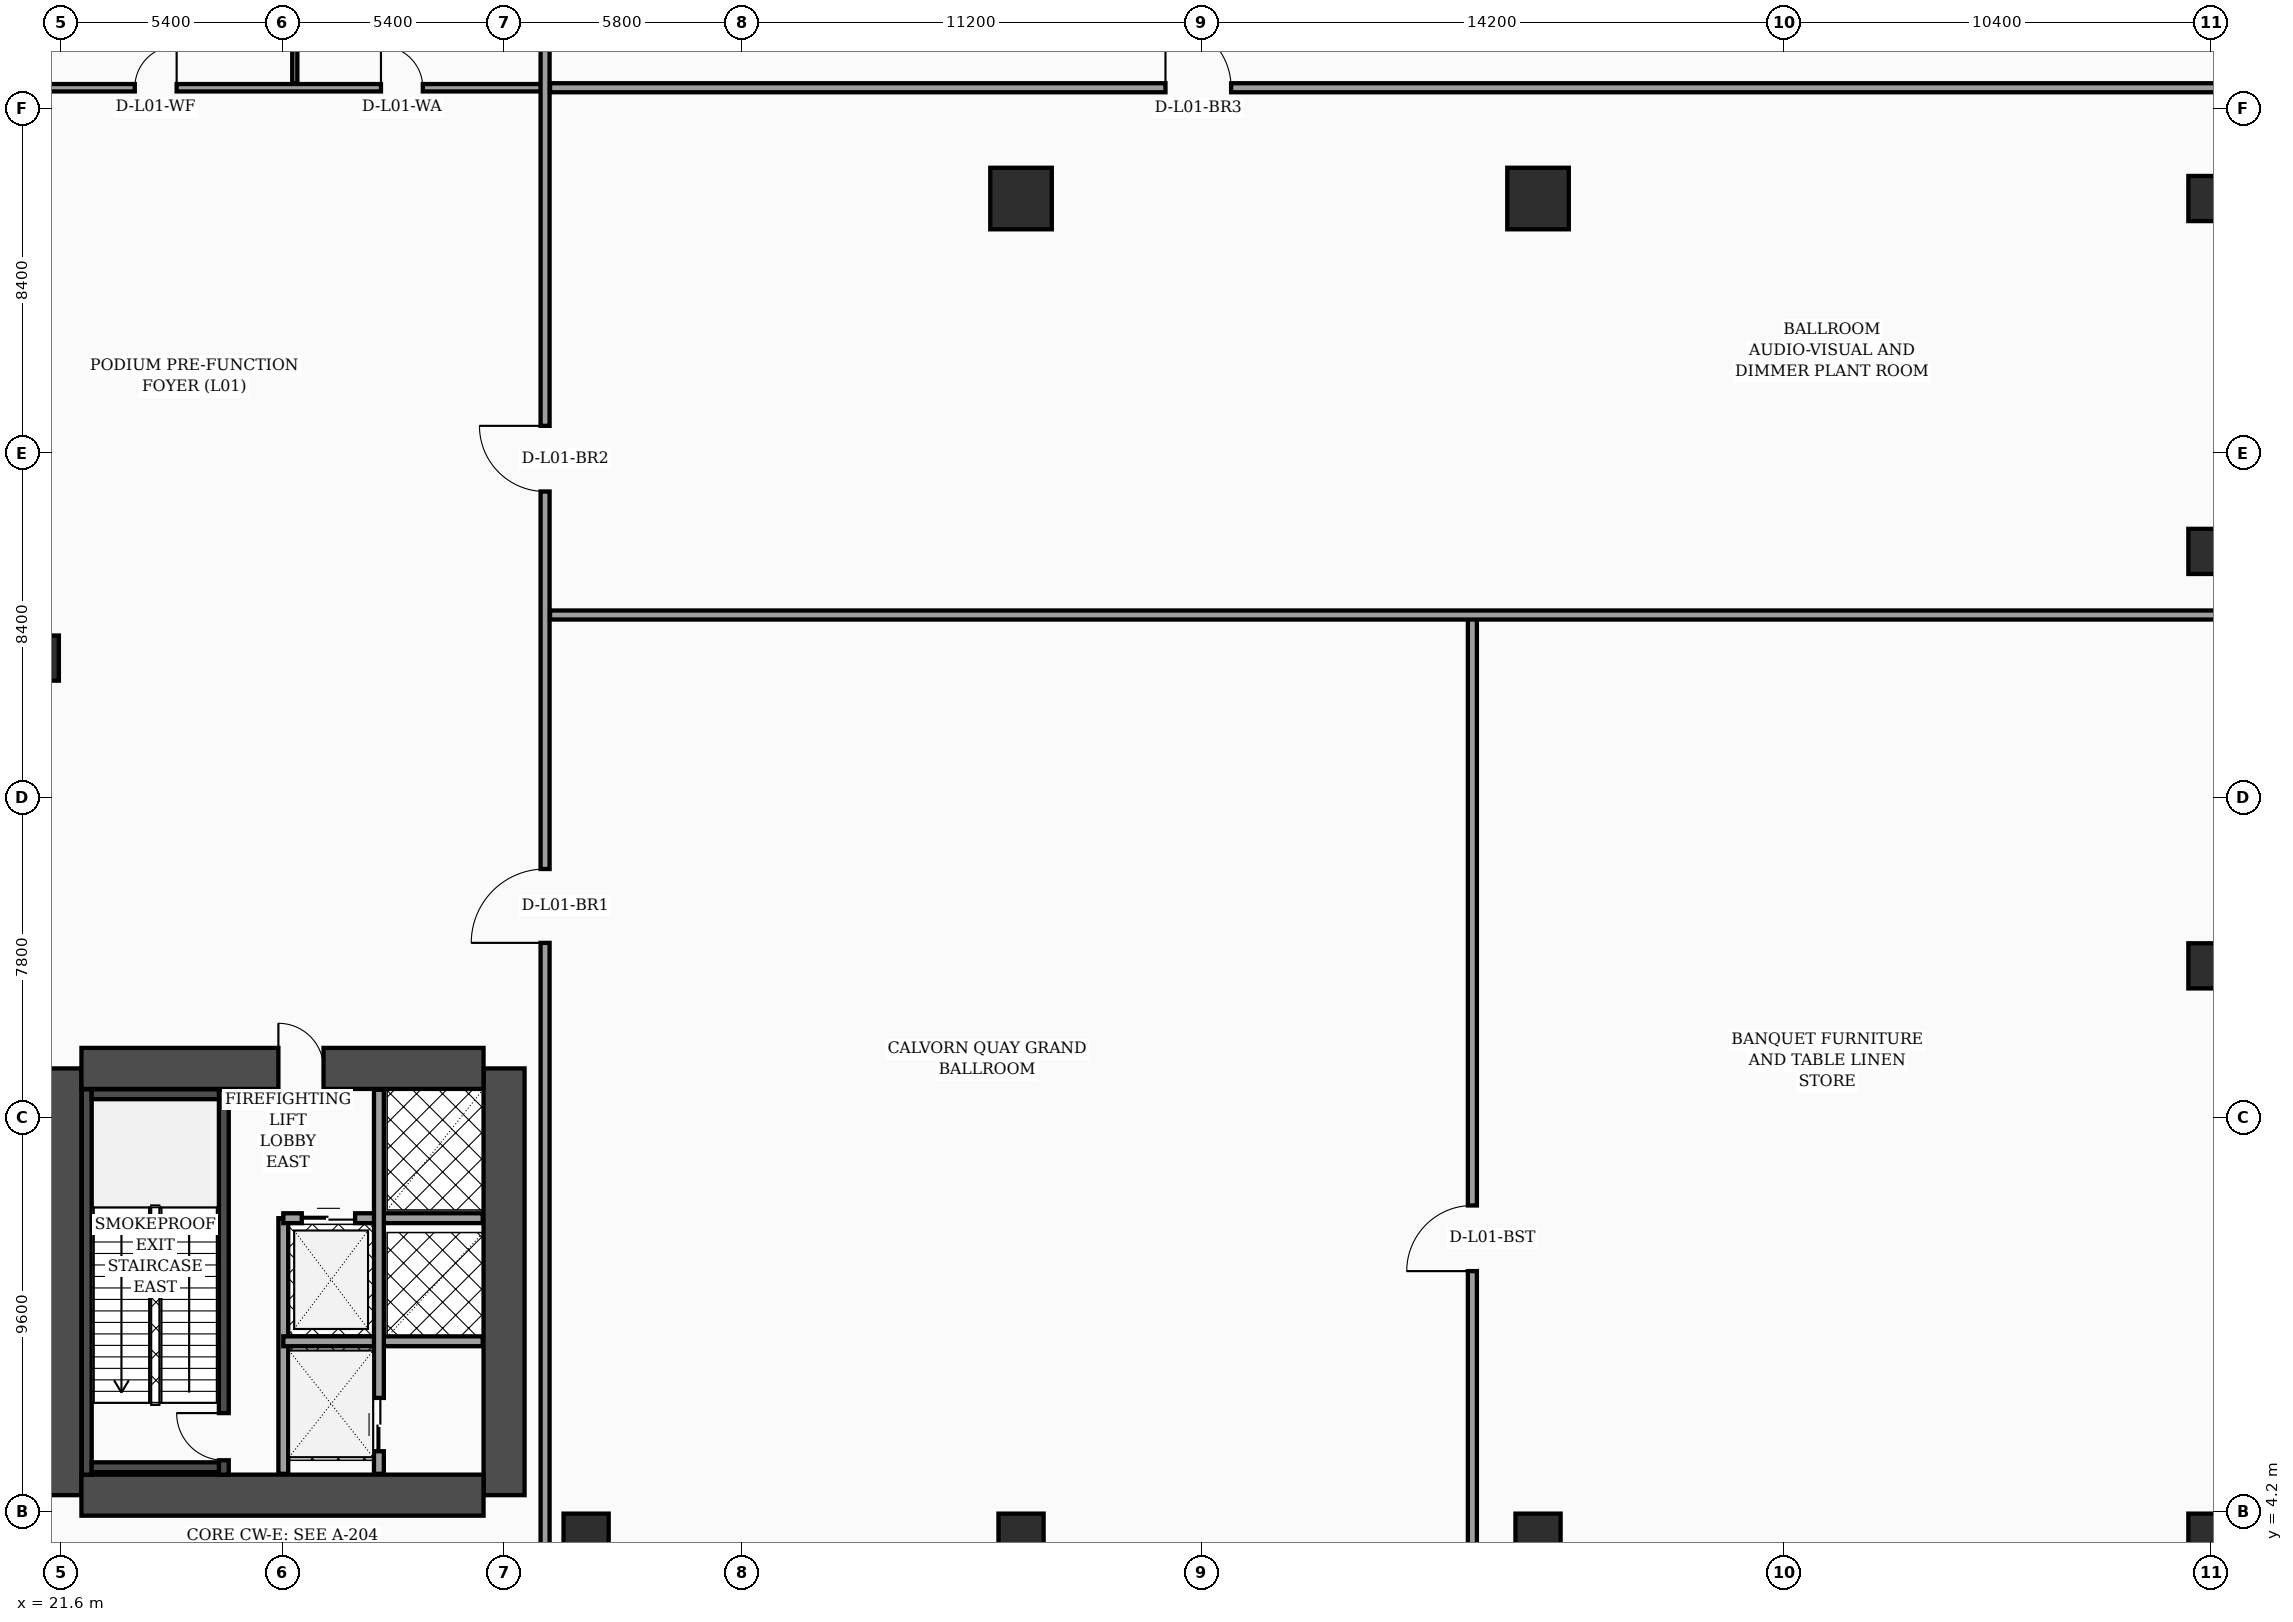
"""IFC4 building model, lengths in metres.
Left out: names, types, materials, properties, quantities, classifications, styles, units other than length and angle.
Written with IfcOpenShell. Run it as: python <this file> out.ifc"""

import sys

from ifc_helpers import new_model, si_unit, direction, frame, frame_2d, origin, origin_2d, place, context, subcontext, project, spatial, rectangle, hollow_rectangle, extrude, element, fill, save


model = new_model("IFC4")
c1 = context("Model", 3, precision=1e-05, world=origin(), true_north=direction((0.0, 1.0)))
c2 = subcontext(c1, "Body", "Model", "MODEL_VIEW")
j1 = project(units=[si_unit("LENGTHUNIT", "METRE"), si_unit("PLANEANGLEUNIT", "RADIAN")], contexts=[c1])
p1 = place(None, origin())
s1 = spatial("IfcSite", under=j1, at=p1, CompositionType="ELEMENT")
p2 = place(p1, origin())
s2 = spatial("IfcBuilding", under=s1, at=p2, CompositionType="ELEMENT")
p3 = place(p2, frame((0.0, 0.0, 6.0)))
s3 = spatial("IfcBuildingStorey", under=s2, at=p3, CompositionType="ELEMENT", Elevation=6.0)
for number, where, z_axis, x_axis in (
    (1, (21.6, 4.6, 0.0), (0.0, 0.0, 1.0), (0.0, 1.0, 0.0)),
    (2, (32.4, 4.6, 0.0), (0.0, 0.0, 1.0), (0.0, 1.0, 0.0)),
):
    element("IfcWall", number, at=place(p3, frame(where, z_axis=z_axis, x_axis=x_axis)), inside=s3, PredefinedType="SHEAR", context=c2, shape_type="SweptSolid", body=[
        extrude(rectangle(XDim=10.4, YDim=1.0, at=frame_2d((5.2, 0.0))), origin(), (0.0, 0.0, 1.0), 5.68),
    ])
p4 = place(p3, frame((22.1, 15.0, 0.0), z_axis=(0.0, 0.0, 1.0), x_axis=(1.0, 0.0, 0.0)))
e3 = element("IfcWall", 3, at=p4, inside=s3, PredefinedType="SHEAR", context=c2, shape_type="SweptSolid", body=[
    extrude(rectangle(XDim=9.8, YDim=1.0, at=frame_2d((4.9, 0.0))), origin(), (0.0, 0.0, 1.0), 5.68),
])
p5 = place(p4, frame((4.8, 0.0, 0.0)))
e4 = element("IfcOpeningElement", 4, at=p5, cuts=e3, PredefinedType="OPENING", context=c2, shape_type="SweptSolid", body=[
    extrude(rectangle(XDim=1.1, YDim=2.2, at=frame_2d((0.55, 1.1))), frame((0.0, 0.51, 0.0), z_axis=(0.0, -1.0, 0.0), x_axis=(1.0, 0.0, 0.0)), (0.0, 0.0, 1.0), 1.02),
])
p6 = place(p3, frame((22.1, 4.6, 0.0), z_axis=(0.0, 0.0, 1.0), x_axis=(1.0, 0.0, 0.0)))
e5 = element("IfcWall", 5, at=p6, inside=s3, PredefinedType="SHEAR", context=c2, shape_type="SweptSolid", body=[
    extrude(rectangle(XDim=9.8, YDim=1.0, at=frame_2d((4.9, 0.0))), origin(), (0.0, 0.0, 1.0), 5.68),
])
p7 = place(p3, frame((22.23, 5.1, 0.0), z_axis=(0.0, 0.0, 1.0), x_axis=(0.0, 1.0, 0.0)))
e6 = element("IfcWall", 6, at=p7, inside=s3, PredefinedType="SOLIDWALL", context=c2, shape_type="SweptSolid", body=[
    extrude(rectangle(XDim=9.39, YDim=0.24, at=frame_2d((4.695, 0.0))), origin(), (0.0, 0.0, 1.0), 5.68),
])
p8 = place(p3, frame((25.57, 5.1, 0.0), z_axis=(0.0, 0.0, 1.0), x_axis=(0.0, 1.0, 0.0)))
e7 = element("IfcWall", 7, at=p8, inside=s3, PredefinedType="SOLIDWALL", context=c2, shape_type="SweptSolid", body=[
    extrude(rectangle(XDim=9.39, YDim=0.24, at=frame_2d((4.695, 0.0))), origin(), (0.0, 0.0, 1.0), 5.68),
])
p9 = place(p8, frame((0.35, 0.0, 0.0)))
e8 = element("IfcOpeningElement", 8, at=p9, cuts=e7, PredefinedType="OPENING", context=c2, shape_type="SweptSolid", body=[
    extrude(rectangle(XDim=1.15, YDim=2.2, at=frame_2d((0.575, 1.1))), frame((0.0, 0.13, 0.0), z_axis=(0.0, -1.0, 0.0), x_axis=(1.0, 0.0, 0.0)), (0.0, 0.0, 1.0), 0.26),
])
for number, where, z_axis, x_axis in (
    (9, (22.35, 5.28, 0.0), (0.0, 0.0, 1.0), (1.0, 0.0, 0.0)),
    (10, (22.35, 14.37, 0.0), (0.0, 0.0, 1.0), (1.0, 0.0, 0.0)),
):
    element("IfcWall", number, at=place(p3, frame(where, z_axis=z_axis, x_axis=x_axis)), inside=s3, PredefinedType="SOLIDWALL", context=c2, shape_type="SweptSolid", body=[
        extrude(rectangle(XDim=3.1, YDim=0.24, at=frame_2d((1.55, 0.0))), origin(), (0.0, 0.0, 1.0), 5.68),
    ])
for number, where, z_axis, x_axis in (
    (11, (21.0, 25.0, 0.0), (0.0, 0.0, 1.0), (1.0, 0.0, 0.0)),
    (12, (34.4, 3.6, 0.0), (0.0, 0.0, 1.0), (1.0, 0.0, 0.0)),
    (13, (45.0, 3.6, 0.0), (0.0, 0.0, 1.0), (1.0, 0.0, 0.0)),
    (14, (57.6, 3.6, 0.0), (0.0, 0.0, 1.0), (1.0, 0.0, 0.0)),
    (15, (74.0, 3.6, 0.0), (0.0, 0.0, 1.0), (1.0, 0.0, 0.0)),
    (16, (74.0, 17.5, 0.0), (0.0, 0.0, 1.0), (1.0, 0.0, 0.0)),
    (17, (74.0, 27.6, 0.0), (0.0, 0.0, 1.0), (1.0, 0.0, 0.0)),
    (18, (74.0, 36.2, 0.0), (0.0, 0.0, 1.0), (1.0, 0.0, 0.0)),
):
    element("IfcColumn", number, at=place(p3, frame(where, z_axis=z_axis, x_axis=x_axis)), inside=s3, PredefinedType="COLUMN", context=c2, shape_type="SweptSolid", body=[
        extrude(hollow_rectangle(XDim=1.1, YDim=1.1, WallThickness=0.045, at=origin_2d()), origin(), (0.0, 0.0, 1.0), 5.68),
    ])
for number, where, z_axis, x_axis in (
    (19, (45.0, 36.2, 0.0), (0.0, 0.0, 1.0), (1.0, 0.0, 0.0)),
    (20, (57.6, 36.2, 0.0), (0.0, 0.0, 1.0), (1.0, 0.0, 0.0)),
):
    element("IfcColumn", number, at=place(p3, frame(where, z_axis=z_axis, x_axis=x_axis)), inside=s3, PredefinedType="COLUMN", context=c2, shape_type="SweptSolid", body=[
        extrude(rectangle(XDim=1.5, YDim=1.5, at=origin_2d()), origin(), (0.0, 0.0, 1.0), 5.68),
    ])
p10 = place(p3, frame((27.02, 5.12, 0.0), z_axis=(0.0, 0.0, 1.0), x_axis=(0.0, 1.0, 0.0)))
e21 = element("IfcWall", 21, at=p10, inside=s3, PredefinedType="SOLIDWALL", context=c2, shape_type="SweptSolid", body=[
    extrude(rectangle(XDim=6.23, YDim=0.24, at=frame_2d((3.115, 0.0))), origin(), (0.0, 0.0, 1.0), 5.68),
])
p11 = place(p3, frame((27.02, 11.35, 0.0), z_axis=(0.0, 0.0, 1.0), x_axis=(1.0, 0.0, 0.0)))
e22 = element("IfcWall", 22, at=p11, inside=s3, PredefinedType="SOLIDWALL", context=c2, shape_type="SweptSolid", body=[
    extrude(rectangle(XDim=4.86, YDim=0.24, at=frame_2d((2.43, 0.0))), origin(), (0.0, 0.0, 1.0), 5.68),
])
p12 = place(p11, frame((0.45, 0.0, 0.0)))
e23 = element("IfcOpeningElement", 23, at=p12, cuts=e22, PredefinedType="OPENING", context=c2, shape_type="SweptSolid", body=[
    extrude(rectangle(XDim=1.3, YDim=2.35, at=frame_2d((0.65, 1.175))), frame((0.0, 0.13, 0.0), z_axis=(0.0, -1.0, 0.0), x_axis=(1.0, 0.0, 0.0)), (0.0, 0.0, 1.0), 0.26),
])
p13 = place(p3, frame((27.02, 8.35, 0.0), z_axis=(0.0, 0.0, 1.0), x_axis=(1.0, 0.0, 0.0)))
e24 = element("IfcWall", 24, at=p13, inside=s3, PredefinedType="SOLIDWALL", context=c2, shape_type="SweptSolid", body=[
    extrude(rectangle(XDim=4.86, YDim=0.24, at=frame_2d((2.43, 0.0))), origin(), (0.0, 0.0, 1.0), 5.68),
])
p14 = place(p3, frame((29.35, 5.12, 0.0), z_axis=(0.0, 0.0, 1.0), x_axis=(0.0, 1.0, 0.0)))
e25 = element("IfcWall", 25, at=p14, inside=s3, PredefinedType="SOLIDWALL", context=c2, shape_type="SweptSolid", body=[
    extrude(rectangle(XDim=9.36, YDim=0.24, at=frame_2d((4.68, 0.0))), origin(), (0.0, 0.0, 1.0), 5.68),
])
p15 = place(p14, frame((0.55, 0.0, 0.0)))
e26 = element("IfcOpeningElement", 26, at=p15, cuts=e25, PredefinedType="OPENING", context=c2, shape_type="SweptSolid", body=[
    extrude(rectangle(XDim=1.3, YDim=2.35, at=frame_2d((0.65, 1.175))), frame((0.0, 0.13, 0.0), z_axis=(0.0, -1.0, 0.0), x_axis=(1.0, 0.0, 0.0)), (0.0, 0.0, 1.0), 0.26),
])
p16 = place(p3, frame((15.2, 38.9, 0.0), z_axis=(0.0, 0.0, 1.0), x_axis=(1.0, 0.0, 0.0)))
e27 = element("IfcWall", 27, at=p16, inside=s3, PredefinedType="PARTITIONING", context=c2, shape_type="SweptSolid", body=[
    extrude(rectangle(XDim=18.1, YDim=0.18, at=frame_2d((9.05, 0.0))), origin(), (0.0, 0.0, 1.0), 4.88),
])
p17 = place(p16, frame((2.2, 0.0, 0.0)))
e28 = element("IfcOpeningElement", 28, at=p17, cuts=e27, PredefinedType="OPENING", context=c2, shape_type="SweptSolid", body=[
    extrude(rectangle(XDim=1.02, YDim=2.2, at=frame_2d((0.51, 1.1))), frame((0.0, 0.1, 0.0), z_axis=(0.0, -1.0, 0.0), x_axis=(1.0, 0.0, 0.0)), (0.0, 0.0, 1.0), 0.2),
])
p18 = place(p16, frame((8.2, 0.0, 0.0)))
e29 = element("IfcOpeningElement", 29, at=p18, cuts=e27, PredefinedType="OPENING", context=c2, shape_type="SweptSolid", body=[
    extrude(rectangle(XDim=1.02, YDim=2.2, at=frame_2d((0.51, 1.1))), frame((0.0, 0.1, 0.0), z_axis=(0.0, -1.0, 0.0), x_axis=(1.0, 0.0, 0.0)), (0.0, 0.0, 1.0), 0.2),
])
p19 = place(p16, frame((14.2, 0.0, 0.0)))
e30 = element("IfcOpeningElement", 30, at=p19, cuts=e27, PredefinedType="OPENING", context=c2, shape_type="SweptSolid", body=[
    extrude(rectangle(XDim=1.02, YDim=2.2, at=frame_2d((0.51, 1.1))), frame((0.0, 0.1, 0.0), z_axis=(0.0, -1.0, 0.0), x_axis=(1.0, 0.0, 0.0)), (0.0, 0.0, 1.0), 0.2),
])
p20 = place(p3, frame((27.3, 39.0, 0.0), z_axis=(0.0, 0.0, 1.0), x_axis=(0.0, 1.0, 0.0)))
e31 = element("IfcWall", 31, at=p20, inside=s3, PredefinedType="PARTITIONING", context=c2, shape_type="SweptSolid", body=[
    extrude(rectangle(XDim=6.2, YDim=0.125, at=frame_2d((3.1, 0.0))), origin(), (0.0, 0.0, 1.0), 5.68),
])
p21 = place(p3, frame((33.4, 0.06, 0.0), z_axis=(0.0, 0.0, 1.0), x_axis=(0.0, 1.0, 0.0)))
e32 = element("IfcWall", 32, at=p21, inside=s3, PredefinedType="SOLIDWALL", context=c2, shape_type="SweptSolid", body=[
    extrude(rectangle(XDim=57.88, YDim=0.22, at=frame_2d((28.94, 0.0))), origin(), (0.0, 0.0, 1.0), 4.88),
])
p22 = place(p21, frame((18.0, 0.0, 0.0)))
e33 = element("IfcOpeningElement", 33, at=p22, cuts=e32, PredefinedType="OPENING", context=c2, shape_type="SweptSolid", body=[
    extrude(rectangle(XDim=1.8, YDim=2.4, at=frame_2d((0.9, 1.2))), frame((0.0, 0.12, 0.0), z_axis=(0.0, -1.0, 0.0), x_axis=(1.0, 0.0, 0.0)), (0.0, 0.0, 1.0), 0.24),
])
p23 = place(p21, frame((29.0, 0.0, 0.0)))
e34 = element("IfcOpeningElement", 34, at=p23, cuts=e32, PredefinedType="OPENING", context=c2, shape_type="SweptSolid", body=[
    extrude(rectangle(XDim=1.6, YDim=2.35, at=frame_2d((0.8, 1.175))), frame((0.0, 0.12, 0.0), z_axis=(0.0, -1.0, 0.0), x_axis=(1.0, 0.0, 0.0)), (0.0, 0.0, 1.0), 0.24),
])
p24 = place(p21, frame((49.0, 0.0, 0.0)))
e35 = element("IfcOpeningElement", 35, at=p24, cuts=e32, PredefinedType="OPENING", context=c2, shape_type="SweptSolid", body=[
    extrude(rectangle(XDim=1.5, YDim=2.22, at=frame_2d((0.75, 1.11))), frame((0.0, 0.12, 0.0), z_axis=(0.0, -1.0, 0.0), x_axis=(1.0, 0.0, 0.0)), (0.0, 0.0, 1.0), 0.24),
])
p25 = place(p3, frame((56.0, 0.06, 0.0), z_axis=(0.0, 0.0, 1.0), x_axis=(0.0, 1.0, 0.0)))
e36 = element("IfcWall", 36, at=p25, inside=s3, PredefinedType="SOLIDWALL", context=c2, shape_type="SweptSolid", body=[
    extrude(rectangle(XDim=25.94, YDim=0.22, at=frame_2d((12.97, 0.0))), origin(), (0.0, 0.0, 1.0), 5.18),
])
p26 = place(p25, frame((10.0, 0.0, 0.0)))
e37 = element("IfcOpeningElement", 37, at=p26, cuts=e36, PredefinedType="OPENING", context=c2, shape_type="SweptSolid", body=[
    extrude(rectangle(XDim=1.6, YDim=2.35, at=frame_2d((0.8, 1.175))), frame((0.0, 0.12, 0.0), z_axis=(0.0, -1.0, 0.0), x_axis=(1.0, 0.0, 0.0)), (0.0, 0.0, 1.0), 0.24),
])
p27 = place(p3, frame((33.52, 26.05, 0.0), z_axis=(0.0, 0.0, 1.0), x_axis=(1.0, 0.0, 0.0)))
e38 = element("IfcWall", 38, at=p27, inside=s3, PredefinedType="SOLIDWALL", context=c2, shape_type="SweptSolid", body=[
    extrude(rectangle(XDim=50.42, YDim=0.22, at=frame_2d((25.21, 0.0))), origin(), (0.0, 0.0, 1.0), 4.18),
])
p28 = place(p3, frame((33.52, 38.9, 0.0), z_axis=(0.0, 0.0, 1.0), x_axis=(1.0, 0.0, 0.0)))
e39 = element("IfcWall", 39, at=p28, inside=s3, PredefinedType="SOLIDWALL", context=c2, shape_type="SweptSolid", body=[
    extrude(rectangle(XDim=50.42, YDim=0.22, at=frame_2d((25.21, 0.0))), origin(), (0.0, 0.0, 1.0), 4.88),
])
p29 = place(p28, frame((15.0, 0.0, 0.0)))
e40 = element("IfcOpeningElement", 40, at=p29, cuts=e39, PredefinedType="OPENING", context=c2, shape_type="SweptSolid", body=[
    extrude(rectangle(XDim=1.6, YDim=2.35, at=frame_2d((0.8, 1.175))), frame((0.0, 0.12, 0.0), z_axis=(0.0, -1.0, 0.0), x_axis=(1.0, 0.0, 0.0)), (0.0, 0.0, 1.0), 0.24),
])
p30 = place(p12, origin())
e41 = element("IfcDoor", 41, at=p30, inside=s3, OperationType="DOUBLE_DOOR_SLIDING", PredefinedType="DOOR", context=c2, shape_type="SweptSolid", body=[
    extrude(rectangle(XDim=1.3, YDim=2.35, at=frame_2d((0.65, 1.175))), frame((0.0, 0.025, 0.0), z_axis=(0.0, -1.0, 0.0), x_axis=(1.0, 0.0, 0.0)), (0.0, 0.0, 1.0), 0.05),
])
fill(e23, e41)
p31 = place(p15, origin())
e42 = element("IfcDoor", 42, at=p31, inside=s3, OperationType="DOUBLE_DOOR_SLIDING", PredefinedType="DOOR", context=c2, shape_type="SweptSolid", body=[
    extrude(rectangle(XDim=1.3, YDim=2.35, at=frame_2d((0.65, 1.175))), frame((0.0, 0.025, 0.0), z_axis=(0.0, -1.0, 0.0), x_axis=(1.0, 0.0, 0.0)), (0.0, 0.0, 1.0), 0.05),
])
fill(e26, e42)
p32 = place(p18, origin())
e43 = element("IfcDoor", 43, at=p32, inside=s3, OperationType="SINGLE_SWING_RIGHT", PredefinedType="DOOR", context=c2, shape_type="SweptSolid", body=[
    extrude(rectangle(XDim=1.02, YDim=2.2, at=frame_2d((0.51, 1.1))), frame((0.0, 0.025, 0.0), z_axis=(0.0, -1.0, 0.0), x_axis=(1.0, 0.0, 0.0)), (0.0, 0.0, 1.0), 0.05),
])
fill(e29, e43)
p33 = place(p19, origin())
e44 = element("IfcDoor", 44, at=p33, inside=s3, OperationType="SINGLE_SWING_LEFT", PredefinedType="DOOR", context=c2, shape_type="SweptSolid", body=[
    extrude(rectangle(XDim=1.02, YDim=2.2, at=frame_2d((0.51, 1.1))), frame((0.0, 0.025, 0.0), z_axis=(0.0, -1.0, 0.0), x_axis=(1.0, 0.0, 0.0)), (0.0, 0.0, 1.0), 0.05),
])
fill(e30, e44)
p34 = place(p22, origin())
e45 = element("IfcDoor", 45, at=p34, inside=s3, OperationType="SINGLE_SWING_LEFT", PredefinedType="DOOR", context=c2, shape_type="SweptSolid", body=[
    extrude(rectangle(XDim=1.8, YDim=2.4, at=frame_2d((0.9, 1.2))), frame((0.0, 0.025, 0.0), z_axis=(0.0, -1.0, 0.0), x_axis=(1.0, 0.0, 0.0)), (0.0, 0.0, 1.0), 0.05),
])
fill(e33, e45)
p35 = place(p23, origin())
e46 = element("IfcDoor", 46, at=p35, inside=s3, OperationType="SINGLE_SWING_RIGHT", PredefinedType="DOOR", context=c2, shape_type="SweptSolid", body=[
    extrude(rectangle(XDim=1.6, YDim=2.35, at=frame_2d((0.8, 1.175))), frame((0.0, 0.025, 0.0), z_axis=(0.0, -1.0, 0.0), x_axis=(1.0, 0.0, 0.0)), (0.0, 0.0, 1.0), 0.05),
])
fill(e34, e46)
p36 = place(p26, origin())
e47 = element("IfcDoor", 47, at=p36, inside=s3, OperationType="SINGLE_SWING_LEFT", PredefinedType="DOOR", context=c2, shape_type="SweptSolid", body=[
    extrude(rectangle(XDim=1.6, YDim=2.35, at=frame_2d((0.8, 1.175))), frame((0.0, 0.025, 0.0), z_axis=(0.0, -1.0, 0.0), x_axis=(1.0, 0.0, 0.0)), (0.0, 0.0, 1.0), 0.05),
])
fill(e37, e47)
p37 = place(p29, origin())
e48 = element("IfcDoor", 48, at=p37, inside=s3, OperationType="SINGLE_SWING_LEFT", PredefinedType="DOOR", context=c2, shape_type="SweptSolid", body=[
    extrude(rectangle(XDim=1.6, YDim=2.35, at=frame_2d((0.8, 1.175))), frame((0.0, 0.025, 0.0), z_axis=(0.0, -1.0, 0.0), x_axis=(1.0, 0.0, 0.0)), (0.0, 0.0, 1.0), 0.05),
])
fill(e40, e48)
p38 = place(p9, origin())
e49 = element("IfcDoor", 49, at=p38, inside=s3, OperationType="SINGLE_SWING_RIGHT", PredefinedType="DOOR", context=c2, shape_type="SweptSolid", body=[
    extrude(rectangle(XDim=1.15, YDim=2.2, at=frame_2d((0.575, 1.1))), frame((0.0, 0.025, 0.0), z_axis=(0.0, -1.0, 0.0), x_axis=(1.0, 0.0, 0.0)), (0.0, 0.0, 1.0), 0.05),
])
fill(e8, e49)
p39 = place(p5, origin())
e50 = element("IfcDoor", 50, at=p39, inside=s3, OperationType="SINGLE_SWING_LEFT", PredefinedType="DOOR", context=c2, shape_type="SweptSolid", body=[
    extrude(rectangle(XDim=1.1, YDim=2.2, at=frame_2d((0.55, 1.1))), frame((0.0, 0.025, 0.0), z_axis=(0.0, -1.0, 0.0), x_axis=(1.0, 0.0, 0.0)), (0.0, 0.0, 1.0), 0.05),
])
fill(e4, e50)
save(model, sys.argv[1])
